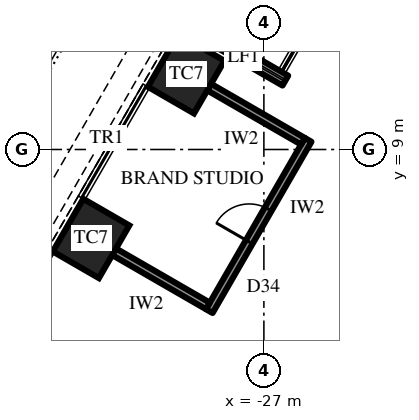
"""IFC4 building model, lengths in metres.
Left out: names, types, materials, properties, quantities, classifications, styles, units other than length and angle.
Written with IfcOpenShell. Run it as: python <this file> out.ifc"""

import sys

from ifc_helpers import new_model, si_unit, direction, frame, frame_2d, origin, origin_2d, place, context, subcontext, project, spatial, rectangle, extrude, element, fill, save


model = new_model("IFC4")
c1 = context("Model", 3, precision=1e-05, world=origin(), true_north=direction((0.0, 1.0)))
c2 = subcontext(c1, "Body", "Model", "MODEL_VIEW")
j1 = project(units=[si_unit("LENGTHUNIT", "METRE"), si_unit("PLANEANGLEUNIT", "RADIAN")], contexts=[c1])
p1 = place(None, origin())
s1 = spatial("IfcSite", under=j1, at=p1, CompositionType="ELEMENT")
p2 = place(p1, origin())
s2 = spatial("IfcBuilding", under=s1, at=p2, CompositionType="ELEMENT")
p3 = place(p2, frame((0.0, 0.0, 174.1)))
s3 = spatial("IfcBuildingStorey", under=s2, at=p3, CompositionType="ELEMENT", Elevation=174.1)
for number, where, z_axis, x_axis in (
    (1, (-29.045, 10.992, 0.0), (0.0, 0.0, 1.0), (-0.5, -0.866, 0.0)),
    (2, (-31.547, 6.658, 0.0), (0.0, 0.0, 1.0), (-0.5, -0.866, 0.0)),
):
    element("IfcColumn", number, at=place(p3, frame(where, z_axis=z_axis, x_axis=x_axis)), inside=s3, PredefinedType="COLUMN", context=c2, shape_type="SweptSolid", body=[
        extrude(rectangle(XDim=1.6, YDim=1.4, at=origin_2d()), origin(), (0.0, 0.0, 1.0), 4.2),
    ])
p4 = place(p3, frame((-29.12, 12.363, 0.0), z_axis=(0.0, 0.0, 1.0), x_axis=(0.86602952684, -0.49999285859, 0.0)))
e3 = element("IfcWall", 3, at=p4, inside=s3, PredefinedType="SOLIDWALL", context=c2, shape_type="SweptSolid", body=[
    extrude(rectangle(XDim=3.1, YDim=0.3, at=frame_2d((1.55, 0.0))), origin(), (0.0, 0.0, 1.0), 2.75),
])
p5 = place(p3, frame((-25.834, 9.253, 0.0), z_axis=(0.0, 0.0, 1.0), x_axis=(-0.500009456303, -0.866019944116, 0.0)))
e4 = element("IfcWall", 4, at=p5, inside=s3, PredefinedType="PARTITIONING", context=c2, shape_type="SweptSolid", body=[
    extrude(rectangle(XDim=5.204, YDim=0.2, at=frame_2d((2.602, 0.0))), origin(), (0.0, 0.0, 1.0), 4.0),
])
p6 = place(p5, frame((2.102, 0.0, 0.0)))
e5 = element("IfcOpeningElement", 5, at=p6, cuts=e4, PredefinedType="OPENING", context=c2, shape_type="SweptSolid", body=[
    extrude(rectangle(XDim=1.0, YDim=2.2, at=frame_2d((0.5, 1.1))), frame((0.0, 0.11, 0.0), z_axis=(0.0, -1.0, 0.0), x_axis=(1.0, 0.0, 0.0)), (0.0, 0.0, 1.0), 0.22),
])
p7 = place(p3, frame((-25.971, 9.217, 0.0), z_axis=(0.0, 0.0, 1.0), x_axis=(-0.866004402611, 0.500036373335, 0.0)))
e6 = element("IfcWall", 6, at=p7, inside=s3, PredefinedType="PARTITIONING", context=c2, shape_type="SweptSolid", body=[
    extrude(rectangle(XDim=2.85, YDim=0.2, at=frame_2d((1.425, 0.0))), origin(), (0.0, 0.0, 1.0), 3.082),
])
p8 = place(p3, frame((-28.473, 4.883, 0.0), z_axis=(0.0, 0.0, 1.0), x_axis=(-0.866025820012, 0.499999279071, 0.0)))
e7 = element("IfcWall", 7, at=p8, inside=s3, PredefinedType="PARTITIONING", context=c2, shape_type="SweptSolid", body=[
    extrude(rectangle(XDim=2.85, YDim=0.2, at=frame_2d((1.425, 0.0))), origin(), (0.0, 0.0, 1.0), 3.082),
])
p9 = place(p6, frame((1.0, 0.0, 0.0), z_axis=(0.0, 0.0, 1.0), x_axis=(-1.0, 0.0, 0.0)))
e8 = element("IfcDoor", 8, at=p9, inside=s3, OperationType="SINGLE_SWING_RIGHT", PredefinedType="DOOR", context=c2, shape_type="SweptSolid", body=[
    extrude(rectangle(XDim=1.0, YDim=2.2, at=frame_2d((0.5, 1.1))), frame((0.0, 0.025, 0.0), z_axis=(0.0, -1.0, 0.0), x_axis=(1.0, 0.0, 0.0)), (0.0, 0.0, 1.0), 0.05),
])
fill(e5, e8)
save(model, sys.argv[1])
